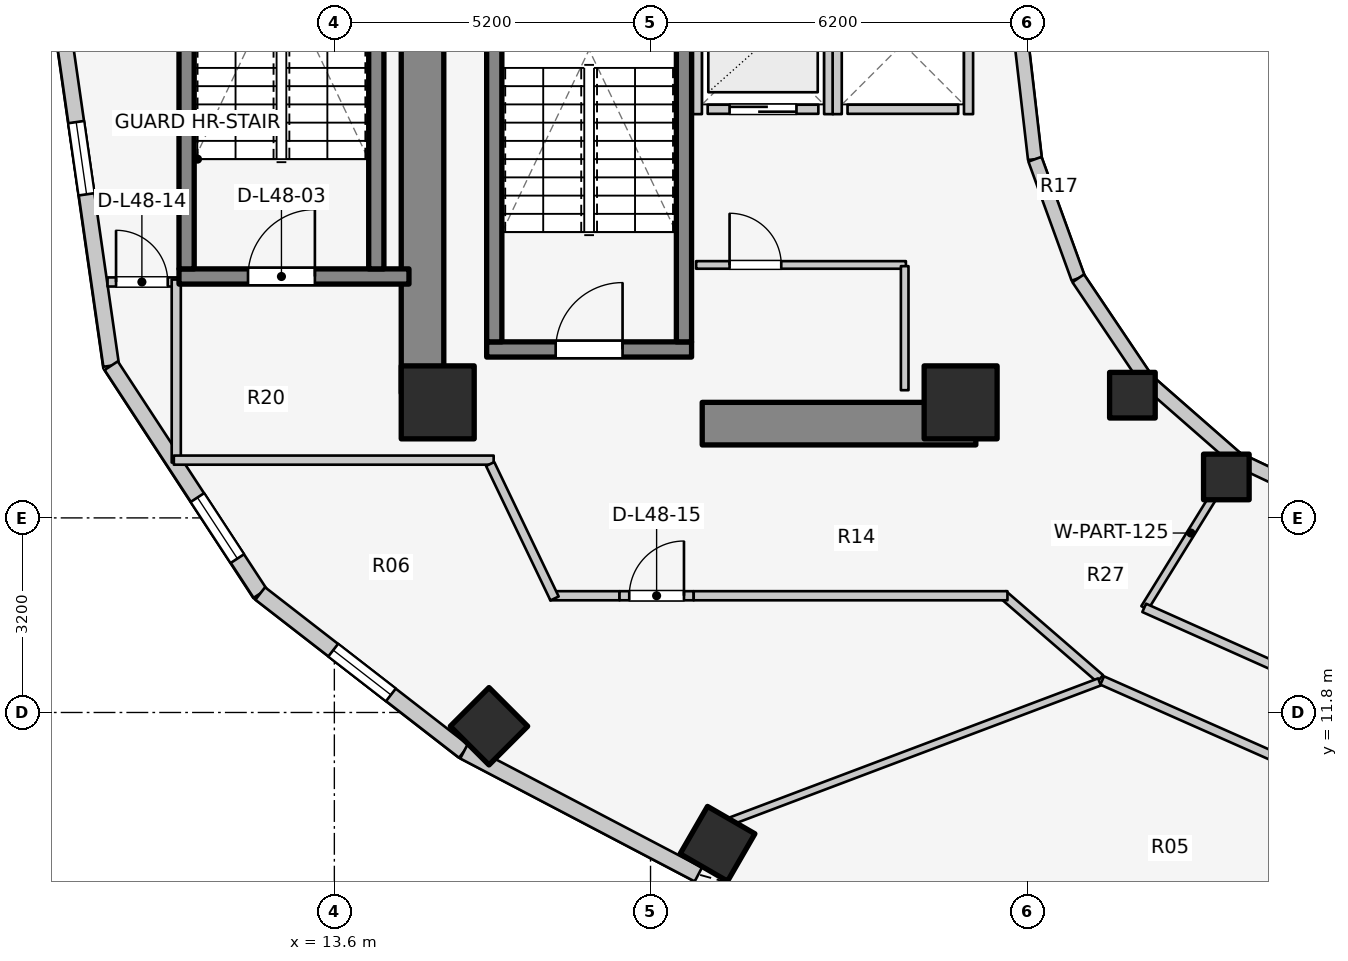
"""IFC4 building model, lengths in metres.
Left out: names, types, materials, properties, quantities, classifications, styles, units other than length and angle.
Written with IfcOpenShell. Run it as: python <this file> out.ifc"""

import sys

from ifc_helpers import new_model, si_unit, direction, frame, frame_2d, origin, origin_2d, place, context, subcontext, project, spatial, rectangle, extrude, element, fill, save


model = new_model("IFC4")
c1 = context("Model", 3, precision=1e-05, world=origin(), true_north=direction((0.0, 1.0)))
c2 = subcontext(c1, "Body", "Model", "MODEL_VIEW")
j1 = project(units=[si_unit("LENGTHUNIT", "METRE"), si_unit("PLANEANGLEUNIT", "RADIAN")], contexts=[c1])
p1 = place(None, origin())
s1 = spatial("IfcSite", under=j1, at=p1, CompositionType="ELEMENT")
p2 = place(p1, origin())
s2 = spatial("IfcBuilding", under=s1, at=p2, CompositionType="ELEMENT")
p3 = place(p2, frame((0.0, 0.0, 159.1)))
s3 = spatial("IfcBuildingStorey", under=s2, at=p3, CompositionType="ELEMENT", Elevation=159.1)
p4 = place(p3, frame((15.05, 17.05, 0.0), z_axis=(0.0, 0.0, 1.0), x_axis=(0.0, 1.0, 0.0)))
e1 = element("IfcWall", 1, at=p4, inside=s3, PredefinedType="SHEAR", context=c2, shape_type="SweptSolid", body=[
    extrude(rectangle(XDim=12.8, YDim=0.7, at=frame_2d((6.4, 0.0))), origin(), (0.0, 0.0, 1.0), 3.1),
])
p5 = place(p3, frame((19.65, 16.55, 0.0), z_axis=(0.0, 0.0, 1.0), x_axis=(1.0, 0.0, 0.0)))
e2 = element("IfcWall", 2, at=p5, inside=s3, PredefinedType="SHEAR", context=c2, shape_type="SweptSolid", body=[
    extrude(rectangle(XDim=4.5, YDim=0.7, at=frame_2d((2.25, 0.0))), origin(), (0.0, 0.0, 1.0), 3.1),
])
p6 = place(p3, frame((16.105, 17.77, 0.0), z_axis=(0.0, 0.0, 1.0), x_axis=(1.0, 0.0, 0.0)))
e3 = element("IfcWall", 3, at=p6, inside=s3, PredefinedType="SOLIDWALL", context=c2, shape_type="SweptSolid", body=[
    extrude(rectangle(XDim=3.37, YDim=0.25, at=frame_2d((1.685, 0.0))), origin(), (0.0, 0.0, 1.0), 3.1),
])
p7 = place(p6, frame((1.135, 0.0, 0.0)))
e4 = element("IfcOpeningElement", 4, at=p7, cuts=e3, PredefinedType="OPENING", context=c2, shape_type="SweptSolid", body=[
    extrude(rectangle(XDim=1.1, YDim=2.1, at=frame_2d((0.55, 1.05))), frame((0.0, 0.135, 0.0), z_axis=(0.0, -1.0, 0.0), x_axis=(1.0, 0.0, 0.0)), (0.0, 0.0, 1.0), 0.27),
])
for number, where, z_axis, x_axis in (
    (5, (16.23, 17.895, 0.0), (0.0, 0.0, 1.0), (0.0, 1.0, 0.0)),
    (6, (19.35, 17.895, 0.0), (0.0, 0.0, 1.0), (0.0, 1.0, 0.0)),
):
    element("IfcWall", number, at=place(p3, frame(where, z_axis=z_axis, x_axis=x_axis)), inside=s3, PredefinedType="SOLIDWALL", context=c2, shape_type="SweptSolid", body=[
        extrude(rectangle(XDim=7.81, YDim=0.25, at=frame_2d((3.905, 0.0))), origin(), (0.0, 0.0, 1.0), 3.1),
    ])
p8 = place(p3, frame((11.045, 18.97, 0.0), z_axis=(0.0, 0.0, 1.0), x_axis=(1.0, 0.0, 0.0)))
e7 = element("IfcWall", 7, at=p8, inside=s3, PredefinedType="SOLIDWALL", context=c2, shape_type="SweptSolid", body=[
    extrude(rectangle(XDim=3.782, YDim=0.25, at=frame_2d((1.891, 0.0))), origin(), (0.0, 0.0, 1.0), 3.1),
])
p9 = place(p8, frame((1.135, 0.0, 0.0)))
e8 = element("IfcOpeningElement", 8, at=p9, cuts=e7, PredefinedType="OPENING", context=c2, shape_type="SweptSolid", body=[
    extrude(rectangle(XDim=1.1, YDim=2.1, at=frame_2d((0.55, 1.05))), frame((0.0, 0.135, 0.0), z_axis=(0.0, -1.0, 0.0), x_axis=(1.0, 0.0, 0.0)), (0.0, 0.0, 1.0), 0.27),
])
for number, where, z_axis, x_axis in (
    (9, (11.17, 19.095, 0.0), (0.0, 0.0, 1.0), (0.0, 1.0, 0.0)),
    (10, (14.29, 19.095, 0.0), (0.0, 0.0, 1.0), (0.0, 1.0, 0.0)),
):
    element("IfcWall", number, at=place(p3, frame(where, z_axis=z_axis, x_axis=x_axis)), inside=s3, PredefinedType="SOLIDWALL", context=c2, shape_type="SweptSolid", body=[
        extrude(rectangle(XDim=7.81, YDim=0.25, at=frame_2d((3.905, 0.0))), origin(), (0.0, 0.0, 1.0), 3.1),
    ])
for number, where, z_axis, x_axis in (
    (11, (15.3, 16.9, 0.0), (0.0, 0.0, 1.0), (1.0, 0.0, 0.0)),
    (12, (23.9, 16.9, 0.0), (0.0, 0.0, 1.0), (1.0, 0.0, 0.0)),
):
    element("IfcColumn", number, at=place(p3, frame(where, z_axis=z_axis, x_axis=x_axis)), inside=s3, PredefinedType="COLUMN", context=c2, shape_type="SweptSolid", body=[
        extrude(rectangle(XDim=1.2, YDim=1.2, at=origin_2d()), origin(), (0.0, 0.0, 1.0), 3.1),
    ])
p10 = place(p3, frame((26.725, 17.018, 0.0), z_axis=(0.0, 0.0, 1.0), x_axis=(1.0, 0.0, 0.0)))
e13 = element("IfcColumn", 13, at=p10, inside=s3, PredefinedType="COLUMN", context=c2, shape_type="SweptSolid", body=[
    extrude(rectangle(XDim=0.75, YDim=0.75, at=origin_2d()), origin(), (0.0, 0.0, 1.0), 3.1),
])
p11 = place(p3, frame((16.143, 11.573, 0.0), z_axis=(0.0, 0.0, 1.0), x_axis=(-0.707106781187, -0.707106781187, 0.0)))
e14 = element("IfcColumn", 14, at=p11, inside=s3, PredefinedType="COLUMN", context=c2, shape_type="SweptSolid", body=[
    extrude(rectangle(XDim=0.9, YDim=0.9, at=origin_2d()), origin(), (0.0, 0.0, 1.0), 3.1),
])
p12 = place(p3, frame((28.27, 15.673, 0.0), z_axis=(0.0, 0.0, 1.0), x_axis=(1.0, 0.0, 0.0)))
e15 = element("IfcColumn", 15, at=p12, inside=s3, PredefinedType="COLUMN", context=c2, shape_type="SweptSolid", body=[
    extrude(rectangle(XDim=0.75, YDim=0.75, at=origin_2d()), origin(), (0.0, 0.0, 1.0), 3.1),
])
p13 = place(p3, frame((19.902, 9.641, 0.0), z_axis=(0.0, 0.0, 1.0), x_axis=(-0.5, -0.866025403784, 0.0)))
e16 = element("IfcColumn", 16, at=p13, inside=s3, PredefinedType="COLUMN", context=c2, shape_type="SweptSolid", body=[
    extrude(rectangle(XDim=0.9, YDim=0.9, at=origin_2d()), origin(), (0.0, 0.0, 1.0), 3.1),
])
p14 = place(p3, frame((24.88, 23.0, 0.0), z_axis=(0.0, 0.0, 1.0), x_axis=(0.114711713601, -0.993398823617, 0.0)))
e17 = element("IfcWall", 17, at=p14, inside=s3, PredefinedType="STANDARD", context=c2, shape_type="SweptSolid", body=[
    extrude(rectangle(XDim=2.115, YDim=0.23, at=frame_2d((1.058, 0.0))), origin(), (0.0, 0.0, 1.0), 2.56),
])
p15 = place(p3, frame((25.123, 20.898, 0.0), z_axis=(0.0, 0.0, 1.0), x_axis=(0.341423187295, -0.93990968033, 0.0)))
e18 = element("IfcWall", 18, at=p15, inside=s3, PredefinedType="STANDARD", context=c2, shape_type="SweptSolid", body=[
    extrude(rectangle(XDim=2.084, YDim=0.23, at=frame_2d((1.042, 0.0))), origin(), (0.0, 0.0, 1.0), 2.56),
])
p16 = place(p3, frame((25.834, 18.94, 0.0), z_axis=(0.0, 0.0, 1.0), x_axis=(0.558197800898, -0.829707909492, 0.0)))
e19 = element("IfcWall", 19, at=p16, inside=s3, PredefinedType="STANDARD", context=c2, shape_type="SweptSolid", body=[
    extrude(rectangle(XDim=2.027, YDim=0.23, at=frame_2d((1.013, 0.0))), origin(), (0.0, 0.0, 1.0), 1.22),
])
p17 = place(p3, frame((26.965, 17.258, 0.0), z_axis=(0.0, 0.0, 1.0), x_axis=(0.752576694707, -0.658504607869, 0.0)))
e20 = element("IfcWall", 20, at=p17, inside=s3, PredefinedType="STANDARD", context=c2, shape_type="SweptSolid", body=[
    extrude(rectangle(XDim=1.959, YDim=0.23, at=frame_2d((0.98, 0.0))), origin(), (0.0, 0.0, 1.0), 1.22),
])
p18 = place(p3, frame((28.44, 15.968, 0.0), z_axis=(0.0, 0.0, 1.0), x_axis=(0.904179699603, -0.427152280606, 0.0)))
e21 = element("IfcWall", 21, at=p18, inside=s3, PredefinedType="STANDARD", context=c2, shape_type="SweptSolid", body=[
    extrude(rectangle(XDim=1.899, YDim=0.23, at=frame_2d((0.95, 0.0))), origin(), (0.0, 0.0, 1.0), 1.22),
])
p19 = place(p3, frame((9.14, 23.0, 0.0), z_axis=(0.0, 0.0, 1.0), x_axis=(0.142227632286, -0.989833976288, 0.0)))
e22 = element("IfcWall", 22, at=p19, inside=s3, PredefinedType="STANDARD", context=c2, shape_type="SweptSolid", body=[
    extrude(rectangle(XDim=5.553, YDim=0.26, at=frame_2d((2.776, 0.0))), origin(), (0.0, 0.0, 1.0), 2.57),
])
p20 = place(p19, frame((1.506, 0.0, 0.75)))
e23 = element("IfcOpeningElement", 23, at=p20, cuts=e22, PredefinedType="OPENING", context=c2, shape_type="SweptSolid", body=[
    extrude(rectangle(XDim=1.2, YDim=1.5, at=frame_2d((0.6, 0.75))), frame((0.0, 0.14, 0.0), z_axis=(0.0, -1.0, 0.0), x_axis=(1.0, 0.0, 0.0)), (0.0, 0.0, 1.0), 0.28),
])
p21 = place(p3, frame((9.93, 17.503, 0.0), z_axis=(0.0, 0.0, 1.0), x_axis=(0.547456494366, -0.836834145322, 0.0)))
e24 = element("IfcWall", 24, at=p21, inside=s3, PredefinedType="STANDARD", context=c2, shape_type="SweptSolid", body=[
    extrude(rectangle(XDim=4.477, YDim=0.26, at=frame_2d((2.239, 0.0))), origin(), (0.0, 0.0, 1.0), 1.22),
])
p22 = place(p21, frame((2.591, 0.0, 0.15)))
e25 = element("IfcOpeningElement", 25, at=p22, cuts=e24, PredefinedType="OPENING", context=c2, shape_type="SweptSolid", body=[
    extrude(rectangle(XDim=1.2, YDim=0.9, at=frame_2d((0.6, 0.45))), frame((0.0, 0.14, 0.0), z_axis=(0.0, -1.0, 0.0), x_axis=(1.0, 0.0, 0.0)), (0.0, 0.0, 1.0), 0.28),
])
p23 = place(p3, frame((12.381, 13.757, 0.0), z_axis=(0.0, 0.0, 1.0), x_axis=(0.790185650662, -0.612867552973, 0.0)))
e26 = element("IfcWall", 26, at=p23, inside=s3, PredefinedType="STANDARD", context=c2, shape_type="SweptSolid", body=[
    extrude(rectangle(XDim=4.239, YDim=0.26, at=frame_2d((2.12, 0.0))), origin(), (0.0, 0.0, 1.0), 1.22),
])
p24 = place(p23, frame((1.52, 0.0, 0.15)))
e27 = element("IfcOpeningElement", 27, at=p24, cuts=e26, PredefinedType="OPENING", context=c2, shape_type="SweptSolid", body=[
    extrude(rectangle(XDim=1.2, YDim=0.9, at=frame_2d((0.6, 0.45))), frame((0.0, 0.14, 0.0), z_axis=(0.0, -1.0, 0.0), x_axis=(1.0, 0.0, 0.0)), (0.0, 0.0, 1.0), 0.28),
])
p25 = place(p3, frame((15.731, 11.158, 0.0), z_axis=(0.0, 0.0, 1.0), x_axis=(0.885660265226, -0.464333818065, 0.0)))
e28 = element("IfcWall", 28, at=p25, inside=s3, PredefinedType="STANDARD", context=c2, shape_type="SweptSolid", body=[
    extrude(rectangle(XDim=4.354, YDim=0.26, at=frame_2d((2.177, 0.0))), origin(), (0.0, 0.0, 1.0), 1.22),
])
p26 = place(p3, frame((19.74, 21.72, 0.0), z_axis=(0.0, 0.0, 1.0), x_axis=(1.0, 0.0, 0.0)))
e29 = element("IfcWall", 29, at=p26, inside=s3, PredefinedType="SOLIDWALL", context=c2, shape_type="SweptSolid", body=[
    extrude(rectangle(XDim=1.82, YDim=0.15, at=frame_2d((0.91, 0.0))), origin(), (0.0, 0.0, 1.0), 2.575),
])
p27 = place(p26, frame((0.36, 0.0, 0.0)))
e30 = element("IfcOpeningElement", 30, at=p27, cuts=e29, PredefinedType="OPENING", context=c2, shape_type="SweptSolid", body=[
    extrude(rectangle(XDim=1.1, YDim=2.1, at=frame_2d((0.55, 1.05))), frame((0.0, 0.085, 0.0), z_axis=(0.0, -1.0, 0.0), x_axis=(1.0, 0.0, 0.0)), (0.0, 0.0, 1.0), 0.17),
])
for number, where, z_axis, x_axis in (
    (31, (19.57, 21.64, 0.0), (0.0, 0.0, 1.0), (0.0, 1.0, 0.0)),
    (32, (21.73, 21.64, 0.0), (0.0, 0.0, 1.0), (0.0, 1.0, 0.0)),
):
    element("IfcWall", number, at=place(p3, frame(where, z_axis=z_axis, x_axis=x_axis)), inside=s3, PredefinedType="SOLIDWALL", context=c2, shape_type="SweptSolid", body=[
        extrude(rectangle(XDim=2.32, YDim=0.15, at=frame_2d((1.16, 0.0))), origin(), (0.0, 0.0, 1.0), 2.575),
    ])
p28 = place(p3, frame((22.04, 21.72, 0.0), z_axis=(0.0, 0.0, 1.0), x_axis=(1.0, 0.0, 0.0)))
e33 = element("IfcWall", 33, at=p28, inside=s3, PredefinedType="SOLIDWALL", context=c2, shape_type="SweptSolid", body=[
    extrude(rectangle(XDim=1.82, YDim=0.15, at=frame_2d((0.91, 0.0))), origin(), (0.0, 0.0, 1.0), 2.12),
])
p29 = place(p3, frame((21.87, 21.64, 0.0), z_axis=(0.0, 0.0, 1.0), x_axis=(0.0, 1.0, 0.0)))
e34 = element("IfcWall", 34, at=p29, inside=s3, PredefinedType="SOLIDWALL", context=c2, shape_type="SweptSolid", body=[
    extrude(rectangle(XDim=2.32, YDim=0.15, at=frame_2d((1.16, 0.0))), origin(), (0.0, 0.0, 1.0), 2.575),
])
p30 = place(p3, frame((24.03, 21.64, 0.0), z_axis=(0.0, 0.0, 1.0), x_axis=(0.0, 1.0, 0.0)))
e35 = element("IfcWall", 35, at=p30, inside=s3, PredefinedType="SOLIDWALL", context=c2, shape_type="SweptSolid", body=[
    extrude(rectangle(XDim=2.32, YDim=0.15, at=frame_2d((1.16, 0.0))), origin(), (0.0, 0.0, 1.0), 2.12),
])
p31 = place(p3, frame((19.55, 19.16, 0.0), z_axis=(0.0, 0.0, 1.0), x_axis=(1.0, 0.0, 0.0)))
e36 = element("IfcWall", 36, at=p31, inside=s3, PredefinedType="PARTITIONING", context=c2, shape_type="SweptSolid", body=[
    extrude(rectangle(XDim=3.45, YDim=0.125, at=frame_2d((1.725, 0.0))), origin(), (0.0, 0.0, 1.0), 2.12),
])
p32 = place(p31, frame((0.55, 0.0, 0.0)))
e37 = element("IfcOpeningElement", 37, at=p32, cuts=e36, PredefinedType="OPENING", context=c2, shape_type="SweptSolid", body=[
    extrude(rectangle(XDim=0.85, YDim=2.05, at=frame_2d((0.425, 1.025))), frame((0.0, 0.073, 0.0), z_axis=(0.0, -1.0, 0.0), x_axis=(1.0, 0.0, 0.0)), (0.0, 0.0, 1.0), 0.145),
])
p33 = place(p3, frame((22.98, 17.1, 0.0), z_axis=(0.0, 0.0, 1.0), x_axis=(0.0, 1.0, 0.0)))
e38 = element("IfcWall", 38, at=p33, inside=s3, PredefinedType="PARTITIONING", context=c2, shape_type="SweptSolid", body=[
    extrude(rectangle(XDim=2.04, YDim=0.125, at=frame_2d((1.02, 0.0))), origin(), (0.0, 0.0, 1.0), 2.575),
])
p34 = place(p3, frame((9.87, 18.88, 0.0), z_axis=(0.0, 0.0, 1.0), x_axis=(1.0, 0.0, 0.0)))
e39 = element("IfcWall", 39, at=p34, inside=s3, PredefinedType="PARTITIONING", context=c2, shape_type="SweptSolid", body=[
    extrude(rectangle(XDim=1.17, YDim=0.15, at=frame_2d((0.585, 0.0))), origin(), (0.0, 0.0, 1.0), 2.575),
])
p35 = place(p34, frame((0.14, 0.0, 0.0)))
e40 = element("IfcOpeningElement", 40, at=p35, cuts=e39, PredefinedType="OPENING", context=c2, shape_type="SweptSolid", body=[
    extrude(rectangle(XDim=0.85, YDim=2.05, at=frame_2d((0.425, 1.025))), frame((0.0, 0.085, 0.0), z_axis=(0.0, -1.0, 0.0), x_axis=(1.0, 0.0, 0.0)), (0.0, 0.0, 1.0), 0.17),
])
p36 = place(p3, frame((11.0, 15.91, 0.0), z_axis=(0.0, 0.0, 1.0), x_axis=(0.0, 1.0, 0.0)))
e41 = element("IfcWall", 41, at=p36, inside=s3, PredefinedType="PARTITIONING", context=c2, shape_type="SweptSolid", body=[
    extrude(rectangle(XDim=3.01, YDim=0.15, at=frame_2d((1.505, 0.0))), origin(), (0.0, 0.0, 1.0), 2.575),
])
p37 = place(p3, frame((10.96, 15.95, 0.0), z_axis=(0.0, 0.0, 1.0), x_axis=(1.0, 0.0, 0.0)))
e42 = element("IfcWall", 42, at=p37, inside=s3, PredefinedType="PARTITIONING", context=c2, shape_type="SweptSolid", body=[
    extrude(rectangle(XDim=5.26, YDim=0.15, at=frame_2d((2.63, 0.0))), origin(), (0.0, 0.0, 1.0), 1.22),
])
p38 = place(p3, frame((26.193, 12.358, 0.0), z_axis=(0.0, 0.0, 1.0), x_axis=(-0.756055312247, 0.654507727092, 0.0)))
e43 = element("IfcWall", 43, at=p38, inside=s3, PredefinedType="PARTITIONING", context=c2, shape_type="SweptSolid", body=[
    extrude(rectangle(XDim=2.111, YDim=0.15, at=frame_2d((1.055, 0.0))), origin(), (0.0, 0.0, 1.0), 2.019),
])
p39 = place(p3, frame((17.15, 13.72, 0.0), z_axis=(0.0, 0.0, 1.0), x_axis=(1.0, 0.0, 0.0)))
e44 = element("IfcWall", 44, at=p39, inside=s3, PredefinedType="PARTITIONING", context=c2, shape_type="SweptSolid", body=[
    extrude(rectangle(XDim=1.14, YDim=0.15, at=frame_2d((0.57, 0.0))), origin(), (0.0, 0.0, 1.0), 2.575),
])
p40 = place(p3, frame((18.29, 13.72, 0.0), z_axis=(0.0, 0.0, 1.0), x_axis=(1.0, 0.0, 0.0)))
e45 = element("IfcWall", 45, at=p40, inside=s3, PredefinedType="PARTITIONING", context=c2, shape_type="SweptSolid", body=[
    extrude(rectangle(XDim=1.22, YDim=0.15, at=frame_2d((0.61, 0.0))), origin(), (0.0, 0.0, 1.0), 2.575),
])
p41 = place(p40, frame((0.16, 0.0, 0.0)))
e46 = element("IfcOpeningElement", 46, at=p41, cuts=e45, PredefinedType="OPENING", context=c2, shape_type="SweptSolid", body=[
    extrude(rectangle(XDim=0.9, YDim=2.1, at=frame_2d((0.45, 1.05))), frame((0.0, 0.085, 0.0), z_axis=(0.0, -1.0, 0.0), x_axis=(1.0, 0.0, 0.0)), (0.0, 0.0, 1.0), 0.17),
])
p42 = place(p3, frame((19.51, 13.72, 0.0), z_axis=(0.0, 0.0, 1.0), x_axis=(1.0, 0.0, 0.0)))
e47 = element("IfcWall", 47, at=p42, inside=s3, PredefinedType="PARTITIONING", context=c2, shape_type="SweptSolid", body=[
    extrude(rectangle(XDim=5.16, YDim=0.15, at=frame_2d((2.58, 0.0))), origin(), (0.0, 0.0, 1.0), 2.019),
])
p43 = place(p3, frame((17.222, 13.675, 0.0), z_axis=(0.0, 0.0, 1.0), x_axis=(-0.431973389813, 0.901886351207, 0.0)))
e48 = element("IfcWall", 48, at=p43, inside=s3, PredefinedType="PARTITIONING", context=c2, shape_type="SweptSolid", body=[
    extrude(rectangle(XDim=2.452, YDim=0.15, at=frame_2d((1.226, 0.0))), origin(), (0.0, 0.0, 1.0), 2.575),
])
p44 = place(p3, frame((28.45, 15.985, 0.0), z_axis=(0.0, 0.0, 1.0), x_axis=(-0.525627246902, -0.850714991824, 0.0)))
e49 = element("IfcWall", 49, at=p44, inside=s3, PredefinedType="PARTITIONING", context=c2, shape_type="SweptSolid", body=[
    extrude(rectangle(XDim=2.901, YDim=0.125, at=frame_2d((1.451, 0.0))), origin(), (0.0, 0.0, 1.0), 2.019),
])
p45 = place(p3, frame((26.919, 13.521, 0.0), z_axis=(0.0, 0.0, 1.0), x_axis=(0.912888568324, -0.408208845842, 0.0)))
e50 = element("IfcWall", 50, at=p45, inside=s3, PredefinedType="PARTITIONING", context=c2, shape_type="SweptSolid", body=[
    extrude(rectangle(XDim=2.69, YDim=0.15, at=frame_2d((1.345, 0.0))), origin(), (0.0, 0.0, 1.0), 2.019),
])
p46 = place(p3, frame((26.184, 12.302, 0.0), z_axis=(0.0, 0.0, 1.0), x_axis=(-0.935601484289, -0.353057874288, 0.0)))
e51 = element("IfcWall", 51, at=p46, inside=s3, PredefinedType="PARTITIONING", context=c2, shape_type="SweptSolid", body=[
    extrude(rectangle(XDim=6.484, YDim=0.125, at=frame_2d((3.242, 0.0))), origin(), (0.0, 0.0, 1.0), 1.22),
])
p47 = place(p3, frame((26.228, 12.326, 0.0), z_axis=(0.0, 0.0, 1.0), x_axis=(0.914324470734, -0.404982422108, 0.0)))
e52 = element("IfcWall", 52, at=p47, inside=s3, PredefinedType="PARTITIONING", context=c2, shape_type="SweptSolid", body=[
    extrude(rectangle(XDim=3.058, YDim=0.15, at=frame_2d((1.529, 0.0))), origin(), (0.0, 0.0, 1.0), 2.019),
])
p48 = place(p20, origin())
e53 = element("IfcWindow", 53, at=p48, inside=s3, PartitioningType="SINGLE_PANEL", PredefinedType="WINDOW", context=c2, shape_type="SweptSolid", body=[
    extrude(rectangle(XDim=1.2, YDim=1.5, at=frame_2d((0.6, 0.75))), frame((0.0, 0.03, 0.0), z_axis=(0.0, -1.0, 0.0), x_axis=(1.0, 0.0, 0.0)), (0.0, 0.0, 1.0), 0.06),
])
fill(e23, e53)
p49 = place(p22, origin())
e54 = element("IfcWindow", 54, at=p49, inside=s3, PartitioningType="SINGLE_PANEL", PredefinedType="WINDOW", context=c2, shape_type="SweptSolid", body=[
    extrude(rectangle(XDim=1.2, YDim=0.9, at=frame_2d((0.6, 0.45))), frame((0.0, 0.03, 0.0), z_axis=(0.0, -1.0, 0.0), x_axis=(1.0, 0.0, 0.0)), (0.0, 0.0, 1.0), 0.06),
])
fill(e25, e54)
p50 = place(p24, origin())
e55 = element("IfcWindow", 55, at=p50, inside=s3, PartitioningType="SINGLE_PANEL", PredefinedType="WINDOW", context=c2, shape_type="SweptSolid", body=[
    extrude(rectangle(XDim=1.2, YDim=0.9, at=frame_2d((0.6, 0.45))), frame((0.0, 0.03, 0.0), z_axis=(0.0, -1.0, 0.0), x_axis=(1.0, 0.0, 0.0)), (0.0, 0.0, 1.0), 0.06),
])
fill(e27, e55)
p51 = place(p7, origin())
e56 = element("IfcDoor", 56, at=p51, inside=s3, OperationType="SINGLE_SWING_RIGHT", PredefinedType="DOOR", context=c2, shape_type="SweptSolid", body=[
    extrude(rectangle(XDim=1.1, YDim=2.1, at=frame_2d((0.55, 1.05))), frame((0.0, 0.025, 0.0), z_axis=(0.0, -1.0, 0.0), x_axis=(1.0, 0.0, 0.0)), (0.0, 0.0, 1.0), 0.05),
])
fill(e4, e56)
p52 = place(p9, origin())
e57 = element("IfcDoor", 57, at=p52, inside=s3, OperationType="SINGLE_SWING_RIGHT", PredefinedType="DOOR", context=c2, shape_type="SweptSolid", body=[
    extrude(rectangle(XDim=1.1, YDim=2.1, at=frame_2d((0.55, 1.05))), frame((0.0, 0.025, 0.0), z_axis=(0.0, -1.0, 0.0), x_axis=(1.0, 0.0, 0.0)), (0.0, 0.0, 1.0), 0.05),
])
fill(e8, e57)
p53 = place(p27, origin())
e58 = element("IfcDoor", 58, at=p53, inside=s3, OperationType="DOUBLE_DOOR_SLIDING", PredefinedType="DOOR", context=c2, shape_type="SweptSolid", body=[
    extrude(rectangle(XDim=1.1, YDim=2.1, at=frame_2d((0.55, 1.05))), frame((0.0, 0.025, 0.0), z_axis=(0.0, -1.0, 0.0), x_axis=(1.0, 0.0, 0.0)), (0.0, 0.0, 1.0), 0.05),
])
fill(e30, e58)
p54 = place(p32, origin())
e59 = element("IfcDoor", 59, at=p54, inside=s3, OperationType="SINGLE_SWING_LEFT", PredefinedType="DOOR", context=c2, shape_type="SweptSolid", body=[
    extrude(rectangle(XDim=0.85, YDim=2.05, at=frame_2d((0.425, 1.025))), frame((0.0, 0.025, 0.0), z_axis=(0.0, -1.0, 0.0), x_axis=(1.0, 0.0, 0.0)), (0.0, 0.0, 1.0), 0.05),
])
fill(e37, e59)
p55 = place(p35, origin())
e60 = element("IfcDoor", 60, at=p55, inside=s3, OperationType="SINGLE_SWING_LEFT", PredefinedType="DOOR", context=c2, shape_type="SweptSolid", body=[
    extrude(rectangle(XDim=0.85, YDim=2.05, at=frame_2d((0.425, 1.025))), frame((0.0, 0.025, 0.0), z_axis=(0.0, -1.0, 0.0), x_axis=(1.0, 0.0, 0.0)), (0.0, 0.0, 1.0), 0.05),
])
fill(e40, e60)
p56 = place(p41, origin())
e61 = element("IfcDoor", 61, at=p56, inside=s3, OperationType="SINGLE_SWING_RIGHT", PredefinedType="DOOR", context=c2, shape_type="SweptSolid", body=[
    extrude(rectangle(XDim=0.9, YDim=2.1, at=frame_2d((0.45, 1.05))), frame((0.0, 0.025, 0.0), z_axis=(0.0, -1.0, 0.0), x_axis=(1.0, 0.0, 0.0)), (0.0, 0.0, 1.0), 0.05),
])
fill(e46, e61)
save(model, sys.argv[1])
